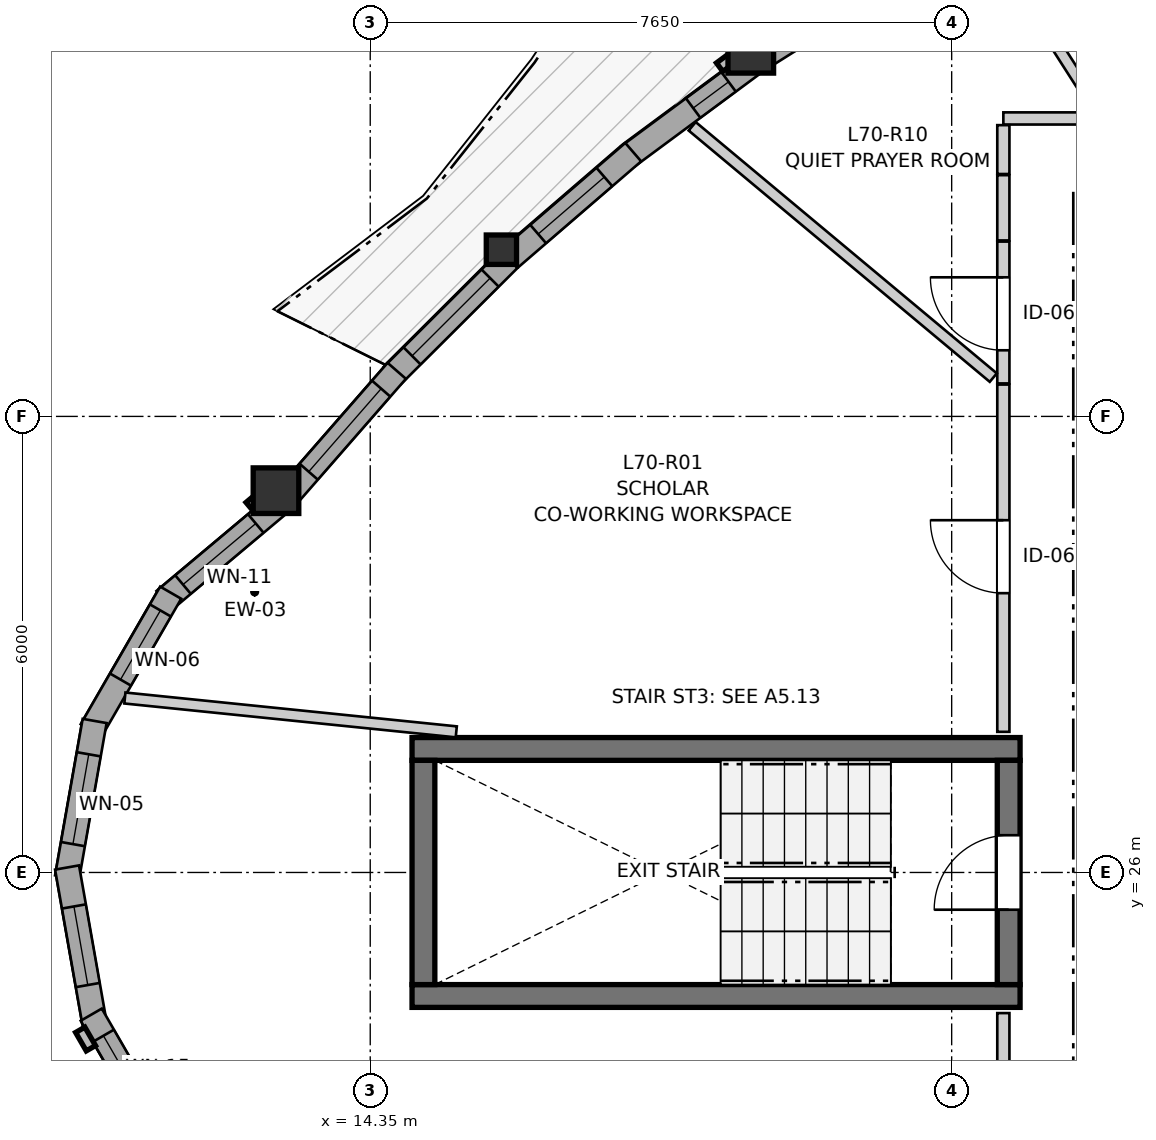
"""IFC4 building model, lengths in metres.
Left out: names, types, materials, properties, quantities, classifications, styles, units other than length and angle.
Written with IfcOpenShell. Run it as: python <this file> out.ifc"""

import sys

from ifc_helpers import new_model, si_unit, direction, frame, frame_2d, origin, origin_2d, place, context, subcontext, project, spatial, rectangle, i_section, extrude, source, transform, mapped, element, fill, save


model = new_model("IFC4")
c1 = context("Model", 3, precision=1e-05, world=origin(), true_north=direction((0.0, 1.0)))
c2 = subcontext(c1, "Body", "Model", "MODEL_VIEW")
j1 = project(units=[si_unit("LENGTHUNIT", "METRE"), si_unit("PLANEANGLEUNIT", "RADIAN")], contexts=[c1])
p1 = place(None, origin())
s1 = spatial("IfcSite", under=j1, at=p1, CompositionType="ELEMENT")
p2 = place(p1, origin())
s2 = spatial("IfcBuilding", under=s1, at=p2, CompositionType="ELEMENT")
p3 = place(p2, frame((0.0, 0.0, 234.0)))
s3 = spatial("IfcBuildingStorey", under=s2, at=p3, CompositionType="ELEMENT", Elevation=234.0)
for number, where, z_axis, x_axis in (
    (1, (14.9, 24.375, 0.0), (0.0, 0.0, 1.0), (1.0, 0.0, 0.0)),
    (2, (22.9, 27.625, 0.0), (0.0, 0.0, 1.0), (-1.0, 0.0, 0.0)),
):
    element("IfcWall", number, at=place(p3, frame(where, z_axis=z_axis, x_axis=x_axis)), inside=s3, PredefinedType="SHEAR", context=c2, shape_type="SweptSolid", body=[
        extrude(rectangle(XDim=8.0, YDim=0.3, at=frame_2d((4.0, 0.0))), origin(), (0.0, 0.0, 1.0), 2.96),
    ])
p4 = place(p3, frame((15.05, 27.475, 0.0), z_axis=(0.0, 0.0, 1.0), x_axis=(0.0, -1.0, 0.0)))
e3 = element("IfcWall", 3, at=p4, inside=s3, PredefinedType="SHEAR", context=c2, shape_type="SweptSolid", body=[
    extrude(rectangle(XDim=2.95, YDim=0.3, at=frame_2d((1.475, 0.0))), origin(), (0.0, 0.0, 1.0), 2.96),
])
p5 = place(p3, frame((22.75, 24.525, 0.0), z_axis=(0.0, 0.0, 1.0), x_axis=(0.0, 1.0, 0.0)))
e4 = element("IfcWall", 4, at=p5, inside=s3, PredefinedType="SHEAR", context=c2, shape_type="SweptSolid", body=[
    extrude(rectangle(XDim=2.95, YDim=0.3, at=frame_2d((1.475, 0.0))), origin(), (0.0, 0.0, 1.0), 2.96),
])
p6 = place(p5, frame((0.985, 0.0, 0.0)))
e5 = element("IfcOpeningElement", 5, at=p6, cuts=e4, PredefinedType="OPENING", context=c2, shape_type="SweptSolid", body=[
    extrude(rectangle(XDim=0.98, YDim=2.15, at=frame_2d((0.49, 1.075))), frame((0.0, 0.16, 0.0), z_axis=(0.0, -1.0, 0.0), x_axis=(1.0, 0.0, 0.0)), (0.0, 0.0, 1.0), 0.32),
])
m1 = source(origin(), c2, "Body", "SweptSolid", [
    extrude(rectangle(XDim=0.6, YDim=0.6, at=origin_2d()), origin(), (0.0, 0.0, 1.0), 2.96),
])
for number, where, z_axis, x_axis in (
    (6, (13.11, 31.023, 0.0), (0.0, 0.0, 1.0), (1.0, 0.0, 0.0)),
    (7, (19.357, 36.817, 0.0), (0.0, 0.0, 1.0), (1.0, 0.0, 0.0)),
):
    element("IfcColumn", number, at=place(p3, frame(where, z_axis=z_axis, x_axis=x_axis)), inside=s3, PredefinedType="COLUMN", context=c2, shape_type="MappedRepresentation", body=[
        mapped(m1, transform((0.0, 0.0, 0.0), x_axis=(1.0, 0.0, 0.0), y_axis=(0.0, 1.0, 0.0), z_axis=(0.0, 0.0, 1.0), scale=1.0)),
    ])
m2 = source(origin(), c2, "Body", "SweptSolid", [
    extrude(i_section(OverallWidth=0.398, OverallDepth=0.387, WebThickness=0.019, FlangeThickness=0.03, FilletRadius=0.015, at=origin_2d()), origin(), (0.0, 0.0, 1.0), 2.96),
])
p7 = place(p3, frame((16.076, 34.193, 0.0), z_axis=(0.0, 0.0, 1.0), x_axis=(1.0, 0.0, 0.0)))
e8 = element("IfcColumn", 8, at=p7, inside=s3, PredefinedType="PILASTER", context=c2, shape_type="MappedRepresentation", body=[
    mapped(m2, transform((0.0, 0.0, 0.0), x_axis=(1.0, 0.0, 0.0), y_axis=(0.0, 1.0, 0.0), z_axis=(0.0, 0.0, 1.0), scale=1.0)),
])
p8 = place(p3, frame((13.144, 30.843, 0.0), z_axis=(0.0, 0.0, 1.0), x_axis=(-0.76606505432, -0.642763045414, 0.0)))
e9 = element("IfcWall", 9, at=p8, inside=s3, PredefinedType="SOLIDWALL", context=c2, shape_type="SweptSolid", body=[
    extrude(rectangle(XDim=1.962, YDim=0.32, at=frame_2d((0.981, 0.0))), origin(), (0.0, 0.0, 1.0), 2.58),
])
p9 = place(p8, frame((0.391, 0.0, 0.82)))
e10 = element("IfcOpeningElement", 10, at=p9, cuts=e9, PredefinedType="OPENING", context=c2, shape_type="SweptSolid", body=[
    extrude(rectangle(XDim=1.25, YDim=1.35, at=frame_2d((0.625, 0.675))), frame((0.0, 0.17, 0.0), z_axis=(0.0, -1.0, 0.0), x_axis=(1.0, 0.0, 0.0)), (0.0, 0.0, 1.0), 0.34),
])
p10 = place(p3, frame((11.725, 29.681, 0.0), z_axis=(0.0, 0.0, 1.0), x_axis=(-0.499995423472, -0.866028046028, 0.0)))
e11 = element("IfcWall", 11, at=p10, inside=s3, PredefinedType="SOLIDWALL", context=c2, shape_type="SweptSolid", body=[
    extrude(rectangle(XDim=2.09, YDim=0.32, at=frame_2d((1.045, 0.0))), origin(), (0.0, 0.0, 1.0), 2.58),
])
p11 = place(p10, frame((0.27, 0.0, 0.82)))
e12 = element("IfcOpeningElement", 12, at=p11, cuts=e11, PredefinedType="OPENING", context=c2, shape_type="SweptSolid", body=[
    extrude(rectangle(XDim=1.05, YDim=1.45, at=frame_2d((0.525, 0.725))), frame((0.0, 0.17, 0.0), z_axis=(0.0, -1.0, 0.0), x_axis=(1.0, 0.0, 0.0)), (0.0, 0.0, 1.0), 0.34),
])
p12 = place(p3, frame((10.724, 27.993, 0.0), z_axis=(0.0, 0.0, 1.0), x_axis=(-0.173672066494, -0.984803540469, 0.0)))
e13 = element("IfcWall", 13, at=p12, inside=s3, PredefinedType="SOLIDWALL", context=c2, shape_type="SweptSolid", body=[
    extrude(rectangle(XDim=2.09, YDim=0.32, at=frame_2d((1.045, 0.0))), origin(), (0.0, 0.0, 1.0), 2.58),
])
p13 = place(p12, frame((0.445, 0.0, 0.82)))
e14 = element("IfcOpeningElement", 14, at=p13, cuts=e13, PredefinedType="OPENING", context=c2, shape_type="SweptSolid", body=[
    extrude(rectangle(XDim=1.2, YDim=1.45, at=frame_2d((0.6, 0.725))), frame((0.0, 0.17, 0.0), z_axis=(0.0, -1.0, 0.0), x_axis=(1.0, 0.0, 0.0)), (0.0, 0.0, 1.0), 0.34),
])
p14 = place(p3, frame((10.361, 26.065, 0.0), z_axis=(0.0, 0.0, 1.0), x_axis=(0.173672066494, -0.984803540469, 0.0)))
e15 = element("IfcWall", 15, at=p14, inside=s3, PredefinedType="SOLIDWALL", context=c2, shape_type="SweptSolid", body=[
    extrude(rectangle(XDim=2.09, YDim=0.32, at=frame_2d((1.045, 0.0))), origin(), (0.0, 0.0, 1.0), 2.58),
])
p15 = place(p14, frame((0.52, 0.0, 0.82)))
e16 = element("IfcOpeningElement", 16, at=p15, cuts=e15, PredefinedType="OPENING", context=c2, shape_type="SweptSolid", body=[
    extrude(rectangle(XDim=1.05, YDim=1.45, at=frame_2d((0.525, 0.725))), frame((0.0, 0.17, 0.0), z_axis=(0.0, -1.0, 0.0), x_axis=(1.0, 0.0, 0.0)), (0.0, 0.0, 1.0), 0.34),
])
p16 = place(p3, frame((10.679, 24.129, 0.0), z_axis=(0.0, 0.0, 1.0), x_axis=(0.499995423472, -0.866028046028, 0.0)))
e17 = element("IfcWall", 17, at=p16, inside=s3, PredefinedType="SOLIDWALL", context=c2, shape_type="SweptSolid", body=[
    extrude(rectangle(XDim=2.09, YDim=0.32, at=frame_2d((1.045, 0.0))), origin(), (0.0, 0.0, 1.0), 2.58),
])
p17 = place(p16, frame((0.32, 0.0, 0.82)))
e18 = element("IfcOpeningElement", 18, at=p17, cuts=e17, PredefinedType="OPENING", context=c2, shape_type="SweptSolid", body=[
    extrude(rectangle(XDim=1.45, YDim=1.25, at=frame_2d((0.725, 0.625))), frame((0.0, 0.17, 0.0), z_axis=(0.0, -1.0, 0.0), x_axis=(1.0, 0.0, 0.0)), (0.0, 0.0, 1.0), 0.34),
])
p18 = place(p3, frame((21.233, 37.808, 0.0), z_axis=(0.0, 0.0, 1.0), x_axis=(-0.84640381825, -0.532541619454, 0.0)))
e19 = element("IfcWall", 19, at=p18, inside=s3, PredefinedType="SOLIDWALL", context=c2, shape_type="SweptSolid", body=[
    extrude(rectangle(XDim=2.026, YDim=0.32, at=frame_2d((1.013, 0.0))), origin(), (0.0, 0.0, 1.0), 2.58),
])
p19 = place(p18, frame((0.393, 0.0, 0.82)))
e20 = element("IfcOpeningElement", 20, at=p19, cuts=e19, PredefinedType="OPENING", context=c2, shape_type="SweptSolid", body=[
    extrude(rectangle(XDim=1.25, YDim=1.35, at=frame_2d((0.625, 0.675))), frame((0.0, 0.17, 0.0), z_axis=(0.0, -1.0, 0.0), x_axis=(1.0, 0.0, 0.0)), (0.0, 0.0, 1.0), 0.34),
])
p20 = place(p3, frame((19.38, 36.635, 0.0), z_axis=(0.0, 0.0, 1.0), x_axis=(-0.803849917549, -0.594832169654, 0.0)))
e21 = element("IfcWall", 21, at=p20, inside=s3, PredefinedType="SOLIDWALL", context=c2, shape_type="SweptSolid", body=[
    extrude(rectangle(XDim=2.038, YDim=0.32, at=frame_2d((1.019, 0.0))), origin(), (0.0, 0.0, 1.0), 2.58),
])
p21 = place(p20, frame((0.392, 0.0, 0.82)))
e22 = element("IfcOpeningElement", 22, at=p21, cuts=e21, PredefinedType="OPENING", context=c2, shape_type="SweptSolid", body=[
    extrude(rectangle(XDim=0.58, YDim=1.35, at=frame_2d((0.29, 0.675))), frame((0.0, 0.17, 0.0), z_axis=(0.0, -1.0, 0.0), x_axis=(1.0, 0.0, 0.0)), (0.0, 0.0, 1.0), 0.34),
])
p22 = place(p3, frame((17.81, 35.477, 0.0), z_axis=(0.0, 0.0, 1.0), x_axis=(-0.757507609111, -0.652826333827, 0.0)))
e23 = element("IfcWall", 23, at=p22, inside=s3, PredefinedType="SOLIDWALL", context=c2, shape_type="SweptSolid", body=[
    extrude(rectangle(XDim=2.132, YDim=0.32, at=frame_2d((1.066, 0.0))), origin(), (0.0, 0.0, 1.0), 2.58),
])
p23 = place(p22, frame((0.501, 0.0, 0.82)))
e24 = element("IfcOpeningElement", 24, at=p23, cuts=e23, PredefinedType="OPENING", context=c2, shape_type="SweptSolid", body=[
    extrude(rectangle(XDim=1.15, YDim=1.2, at=frame_2d((0.575, 0.6))), frame((0.0, 0.17, 0.0), z_axis=(0.0, -1.0, 0.0), x_axis=(1.0, 0.0, 0.0)), (0.0, 0.0, 1.0), 0.34),
])
p24 = place(p3, frame((16.175, 34.066, 0.0), z_axis=(0.0, 0.0, 1.0), x_axis=(-0.708401175315, -0.705810013256, 0.0)))
e25 = element("IfcWall", 25, at=p24, inside=s3, PredefinedType="SOLIDWALL", context=c2, shape_type="SweptSolid", body=[
    extrude(rectangle(XDim=2.167, YDim=0.32, at=frame_2d((1.083, 0.0))), origin(), (0.0, 0.0, 1.0), 2.58),
])
p25 = place(p24, frame((0.348, 0.0, 0.82)))
e26 = element("IfcOpeningElement", 26, at=p25, cuts=e25, PredefinedType="OPENING", context=c2, shape_type="SweptSolid", body=[
    extrude(rectangle(XDim=1.45, YDim=1.25, at=frame_2d((0.725, 0.625))), frame((0.0, 0.17, 0.0), z_axis=(0.0, -1.0, 0.0), x_axis=(1.0, 0.0, 0.0)), (0.0, 0.0, 1.0), 0.34),
])
p26 = place(p3, frame((14.699, 32.6, 0.0), z_axis=(0.0, 0.0, 1.0), x_axis=(-0.657633017404, -0.753338446132, 0.0)))
e27 = element("IfcWall", 27, at=p26, inside=s3, PredefinedType="SOLIDWALL", context=c2, shape_type="SweptSolid", body=[
    extrude(rectangle(XDim=2.143, YDim=0.32, at=frame_2d((1.071, 0.0))), origin(), (0.0, 0.0, 1.0), 2.58),
])
p27 = place(p26, frame((0.311, 0.0, 0.82)))
e28 = element("IfcOpeningElement", 28, at=p27, cuts=e27, PredefinedType="OPENING", context=c2, shape_type="SweptSolid", body=[
    extrude(rectangle(XDim=1.45, YDim=1.25, at=frame_2d((0.725, 0.625))), frame((0.0, 0.17, 0.0), z_axis=(0.0, -1.0, 0.0), x_axis=(1.0, 0.0, 0.0)), (0.0, 0.0, 1.0), 0.34),
])
p28 = place(p3, frame((22.68, 19.271, 0.0), z_axis=(0.0, 0.0, 1.0), x_axis=(0.0, 1.0, 0.0)))
e29 = element("IfcWall", 29, at=p28, inside=s3, PredefinedType="PARTITIONING", context=c2, shape_type="SweptSolid", body=[
    extrude(rectangle(XDim=4.879, YDim=0.16, at=frame_2d((2.439, 0.0))), origin(), (0.0, 0.0, 1.0), 2.96),
])
p29 = place(p28, frame((1.808, 0.0, 0.0)))
e30 = element("IfcOpeningElement", 30, at=p29, cuts=e29, PredefinedType="OPENING", context=c2, shape_type="SweptSolid", body=[
    extrude(rectangle(XDim=1.3, YDim=2.1, at=frame_2d((0.65, 1.05))), frame((0.0, 0.09, 0.0), z_axis=(0.0, -1.0, 0.0), x_axis=(1.0, 0.0, 0.0)), (0.0, 0.0, 1.0), 0.18),
])
p30 = place(p3, frame((22.68, 27.85, 0.0), z_axis=(0.0, 0.0, 1.0), x_axis=(0.0, 1.0, 0.0)))
e31 = element("IfcWall", 31, at=p30, inside=s3, PredefinedType="PARTITIONING", context=c2, shape_type="SweptSolid", body=[
    extrude(rectangle(XDim=4.569, YDim=0.16, at=frame_2d((2.284, 0.0))), origin(), (0.0, 0.0, 1.0), 2.96),
])
p31 = place(p30, frame((1.824, 0.0, 0.0)))
e32 = element("IfcOpeningElement", 32, at=p31, cuts=e31, PredefinedType="OPENING", context=c2, shape_type="SweptSolid", body=[
    extrude(rectangle(XDim=0.96, YDim=2.1, at=frame_2d((0.48, 1.05))), frame((0.0, 0.09, 0.0), z_axis=(0.0, -1.0, 0.0), x_axis=(1.0, 0.0, 0.0)), (0.0, 0.0, 1.0), 0.18),
])
p32 = place(p3, frame((22.68, 32.434, 0.0), z_axis=(0.0, 0.0, 1.0), x_axis=(0.0, 1.0, 0.0)))
e33 = element("IfcWall", 33, at=p32, inside=s3, PredefinedType="PARTITIONING", context=c2, shape_type="SweptSolid", body=[
    extrude(rectangle(XDim=1.866, YDim=0.16, at=frame_2d((0.933, 0.0))), origin(), (0.0, 0.0, 1.0), 2.628),
])
p33 = place(p32, frame((0.436, 0.0, 0.0)))
e34 = element("IfcOpeningElement", 34, at=p33, cuts=e33, PredefinedType="OPENING", context=c2, shape_type="SweptSolid", body=[
    extrude(rectangle(XDim=0.96, YDim=2.1, at=frame_2d((0.48, 1.05))), frame((0.0, 0.09, 0.0), z_axis=(0.0, -1.0, 0.0), x_axis=(1.0, 0.0, 0.0)), (0.0, 0.0, 1.0), 0.18),
])
p34 = place(p3, frame((18.586, 35.817, 0.0), z_axis=(0.0, 0.0, 1.0), x_axis=(0.767767335808, -0.640728739848, 0.0)))
e35 = element("IfcWall", 35, at=p34, inside=s3, PredefinedType="PARTITIONING", context=c2, shape_type="SweptSolid", body=[
    extrude(rectangle(XDim=5.16, YDim=0.145, at=frame_2d((2.58, 0.0))), origin(), (0.0, 0.0, 1.0), 2.96),
])
p35 = place(p3, frame((11.122, 28.295, 0.0), z_axis=(0.0, 0.0, 1.0), x_axis=(0.994824263869, -0.101610452307, 0.0)))
e36 = element("IfcWall", 36, at=p35, inside=s3, PredefinedType="PARTITIONING", context=c2, shape_type="SweptSolid", body=[
    extrude(rectangle(XDim=4.383, YDim=0.145, at=frame_2d((2.191, 0.0))), origin(), (0.0, 0.0, 1.0), 2.96),
])
p36 = place(p3, frame((22.489, 38.27, 0.0), z_axis=(0.0, 0.0, 1.0), x_axis=(0.539324255944, -0.842098181301, 0.0)))
e37 = element("IfcWall", 37, at=p36, inside=s3, PredefinedType="PARTITIONING", context=c2, shape_type="SweptSolid", body=[
    extrude(rectangle(XDim=2.791, YDim=0.145, at=frame_2d((1.396, 0.0))), origin(), (0.0, 0.0, 1.0), 2.96),
])
p37 = place(p3, frame((22.68, 35.92, 0.0), z_axis=(0.0, 0.0, 1.0), x_axis=(1.0, 0.0, 0.0)))
e38 = element("IfcWall", 38, at=p37, inside=s3, PredefinedType="PARTITIONING", context=c2, shape_type="SweptSolid", body=[
    extrude(rectangle(XDim=1.187, YDim=0.16, at=frame_2d((0.593, 0.0))), origin(), (0.0, 0.0, 1.0), 2.96),
])
p38 = place(p3, frame((22.68, 34.315, 0.0), z_axis=(0.0, 0.0, 1.0), x_axis=(0.0, 1.0, 0.0)))
e39 = element("IfcWall", 39, at=p38, inside=s3, PredefinedType="PARTITIONING", context=c2, shape_type="SweptSolid", body=[
    extrude(rectangle(XDim=0.859, YDim=0.16, at=frame_2d((0.43, 0.0))), origin(), (0.0, 0.0, 1.0), 2.96),
])
p39 = place(p3, frame((22.68, 35.189, 0.0), z_axis=(0.0, 0.0, 1.0), x_axis=(0.0, 1.0, 0.0)))
e40 = element("IfcWall", 40, at=p39, inside=s3, PredefinedType="PARTITIONING", context=c2, shape_type="SweptSolid", body=[
    extrude(rectangle(XDim=0.643, YDim=0.16, at=frame_2d((0.322, 0.0))), origin(), (0.0, 0.0, 1.0), 2.96),
])
m3 = source(origin(), c2, "Body", "SweptSolid", [
    extrude(rectangle(XDim=1.25, YDim=1.35, at=frame_2d((0.625, 0.675))), frame((0.0, 0.03, 0.0), z_axis=(0.0, -1.0, 0.0), x_axis=(1.0, 0.0, 0.0)), (0.0, 0.0, 1.0), 0.06),
])
p40 = place(p9, origin())
e41 = element("IfcWindow", 41, at=p40, inside=s3, PartitioningType="SINGLE_PANEL", PredefinedType="WINDOW", context=c2, shape_type="MappedRepresentation", body=[
    mapped(m3, transform((0.0, 0.0, 0.0), x_axis=(1.0, 0.0, 0.0), y_axis=(0.0, 1.0, 0.0), z_axis=(0.0, 0.0, 1.0), scale=1.0)),
])
fill(e10, e41)
m4 = source(origin(), c2, "Body", "SweptSolid", [
    extrude(rectangle(XDim=1.05, YDim=1.45, at=frame_2d((0.525, 0.725))), frame((0.0, 0.03, 0.0), z_axis=(0.0, -1.0, 0.0), x_axis=(1.0, 0.0, 0.0)), (0.0, 0.0, 1.0), 0.06),
])
p41 = place(p11, origin())
e42 = element("IfcWindow", 42, at=p41, inside=s3, PartitioningType="SINGLE_PANEL", PredefinedType="WINDOW", context=c2, shape_type="MappedRepresentation", body=[
    mapped(m4, transform((0.0, 0.0, 0.0), x_axis=(1.0, 0.0, 0.0), y_axis=(0.0, 1.0, 0.0), z_axis=(0.0, 0.0, 1.0), scale=1.0)),
])
fill(e12, e42)
m5 = source(origin(), c2, "Body", "SweptSolid", [
    extrude(rectangle(XDim=1.2, YDim=1.45, at=frame_2d((0.6, 0.725))), frame((0.0, 0.03, 0.0), z_axis=(0.0, -1.0, 0.0), x_axis=(1.0, 0.0, 0.0)), (0.0, 0.0, 1.0), 0.06),
])
p42 = place(p13, origin())
e43 = element("IfcWindow", 43, at=p42, inside=s3, PartitioningType="SINGLE_PANEL", PredefinedType="WINDOW", context=c2, shape_type="MappedRepresentation", body=[
    mapped(m5, transform((0.0, 0.0, 0.0), x_axis=(1.0, 0.0, 0.0), y_axis=(0.0, 1.0, 0.0), z_axis=(0.0, 0.0, 1.0), scale=1.0)),
])
fill(e14, e43)
p43 = place(p15, origin())
e44 = element("IfcWindow", 44, at=p43, inside=s3, PartitioningType="SINGLE_PANEL", PredefinedType="WINDOW", context=c2, shape_type="MappedRepresentation", body=[
    mapped(m4, transform((0.0, 0.0, 0.0), x_axis=(1.0, 0.0, 0.0), y_axis=(0.0, 1.0, 0.0), z_axis=(0.0, 0.0, 1.0), scale=1.0)),
])
fill(e16, e44)
m6 = source(origin(), c2, "Body", "SweptSolid", [
    extrude(rectangle(XDim=1.45, YDim=1.25, at=frame_2d((0.725, 0.625))), frame((0.0, 0.03, 0.0), z_axis=(0.0, -1.0, 0.0), x_axis=(1.0, 0.0, 0.0)), (0.0, 0.0, 1.0), 0.06),
])
p44 = place(p17, origin())
e45 = element("IfcWindow", 45, at=p44, inside=s3, PartitioningType="SINGLE_PANEL", PredefinedType="WINDOW", context=c2, shape_type="MappedRepresentation", body=[
    mapped(m6, transform((0.0, 0.0, 0.0), x_axis=(1.0, 0.0, 0.0), y_axis=(0.0, 1.0, 0.0), z_axis=(0.0, 0.0, 1.0), scale=1.0)),
])
fill(e18, e45)
m7 = source(origin(), c2, "Body", "SweptSolid", [
    extrude(rectangle(XDim=0.58, YDim=1.35, at=frame_2d((0.29, 0.675))), frame((0.0, 0.03, 0.0), z_axis=(0.0, -1.0, 0.0), x_axis=(1.0, 0.0, 0.0)), (0.0, 0.0, 1.0), 0.06),
])
p45 = place(p21, origin())
e46 = element("IfcWindow", 46, at=p45, inside=s3, PartitioningType="SINGLE_PANEL", PredefinedType="WINDOW", context=c2, shape_type="MappedRepresentation", body=[
    mapped(m7, transform((0.0, 0.0, 0.0), x_axis=(1.0, 0.0, 0.0), y_axis=(0.0, 1.0, 0.0), z_axis=(0.0, 0.0, 1.0), scale=1.0)),
])
fill(e22, e46)
m8 = source(origin(), c2, "Body", "SweptSolid", [
    extrude(rectangle(XDim=1.15, YDim=1.2, at=frame_2d((0.575, 0.6))), frame((0.0, 0.03, 0.0), z_axis=(0.0, -1.0, 0.0), x_axis=(1.0, 0.0, 0.0)), (0.0, 0.0, 1.0), 0.06),
])
p46 = place(p23, origin())
e47 = element("IfcWindow", 47, at=p46, inside=s3, PartitioningType="SINGLE_PANEL", PredefinedType="WINDOW", context=c2, shape_type="MappedRepresentation", body=[
    mapped(m8, transform((0.0, 0.0, 0.0), x_axis=(1.0, 0.0, 0.0), y_axis=(0.0, 1.0, 0.0), z_axis=(0.0, 0.0, 1.0), scale=1.0)),
])
fill(e24, e47)
p47 = place(p25, origin())
e48 = element("IfcWindow", 48, at=p47, inside=s3, PartitioningType="SINGLE_PANEL", PredefinedType="WINDOW", context=c2, shape_type="MappedRepresentation", body=[
    mapped(m6, transform((0.0, 0.0, 0.0), x_axis=(1.0, 0.0, 0.0), y_axis=(0.0, 1.0, 0.0), z_axis=(0.0, 0.0, 1.0), scale=1.0)),
])
fill(e26, e48)
p48 = place(p27, origin())
e49 = element("IfcWindow", 49, at=p48, inside=s3, PartitioningType="SINGLE_PANEL", PredefinedType="WINDOW", context=c2, shape_type="MappedRepresentation", body=[
    mapped(m6, transform((0.0, 0.0, 0.0), x_axis=(1.0, 0.0, 0.0), y_axis=(0.0, 1.0, 0.0), z_axis=(0.0, 0.0, 1.0), scale=1.0)),
])
fill(e28, e49)
m9 = source(origin(), c2, "Body", "SweptSolid", [
    extrude(rectangle(XDim=0.98, YDim=2.15, at=frame_2d((0.49, 1.075))), frame((0.0, 0.025, 0.0), z_axis=(0.0, -1.0, 0.0), x_axis=(1.0, 0.0, 0.0)), (0.0, 0.0, 1.0), 0.05),
])
p49 = place(p6, origin())
e50 = element("IfcDoor", 50, at=p49, inside=s3, OperationType="SINGLE_SWING_LEFT", PredefinedType="DOOR", context=c2, shape_type="MappedRepresentation", body=[
    mapped(m9, transform((0.0, 0.0, 0.0), x_axis=(1.0, 0.0, 0.0), y_axis=(0.0, 1.0, 0.0), z_axis=(0.0, 0.0, 1.0), scale=1.0)),
])
fill(e5, e50)
m10 = source(origin(), c2, "Body", "SweptSolid", [
    extrude(rectangle(XDim=0.96, YDim=2.1, at=frame_2d((0.48, 1.05))), frame((0.0, 0.025, 0.0), z_axis=(0.0, -1.0, 0.0), x_axis=(1.0, 0.0, 0.0)), (0.0, 0.0, 1.0), 0.05),
])
p50 = place(p31, origin())
e51 = element("IfcDoor", 51, at=p50, inside=s3, OperationType="SINGLE_SWING_RIGHT", PredefinedType="DOOR", context=c2, shape_type="MappedRepresentation", body=[
    mapped(m10, transform((0.0, 0.0, 0.0), x_axis=(1.0, 0.0, 0.0), y_axis=(0.0, 1.0, 0.0), z_axis=(0.0, 0.0, 1.0), scale=1.0)),
])
fill(e32, e51)
p51 = place(p33, origin())
e52 = element("IfcDoor", 52, at=p51, inside=s3, OperationType="SINGLE_SWING_RIGHT", PredefinedType="DOOR", context=c2, shape_type="MappedRepresentation", body=[
    mapped(m10, transform((0.0, 0.0, 0.0), x_axis=(1.0, 0.0, 0.0), y_axis=(0.0, 1.0, 0.0), z_axis=(0.0, 0.0, 1.0), scale=1.0)),
])
fill(e34, e52)
save(model, sys.argv[1])
